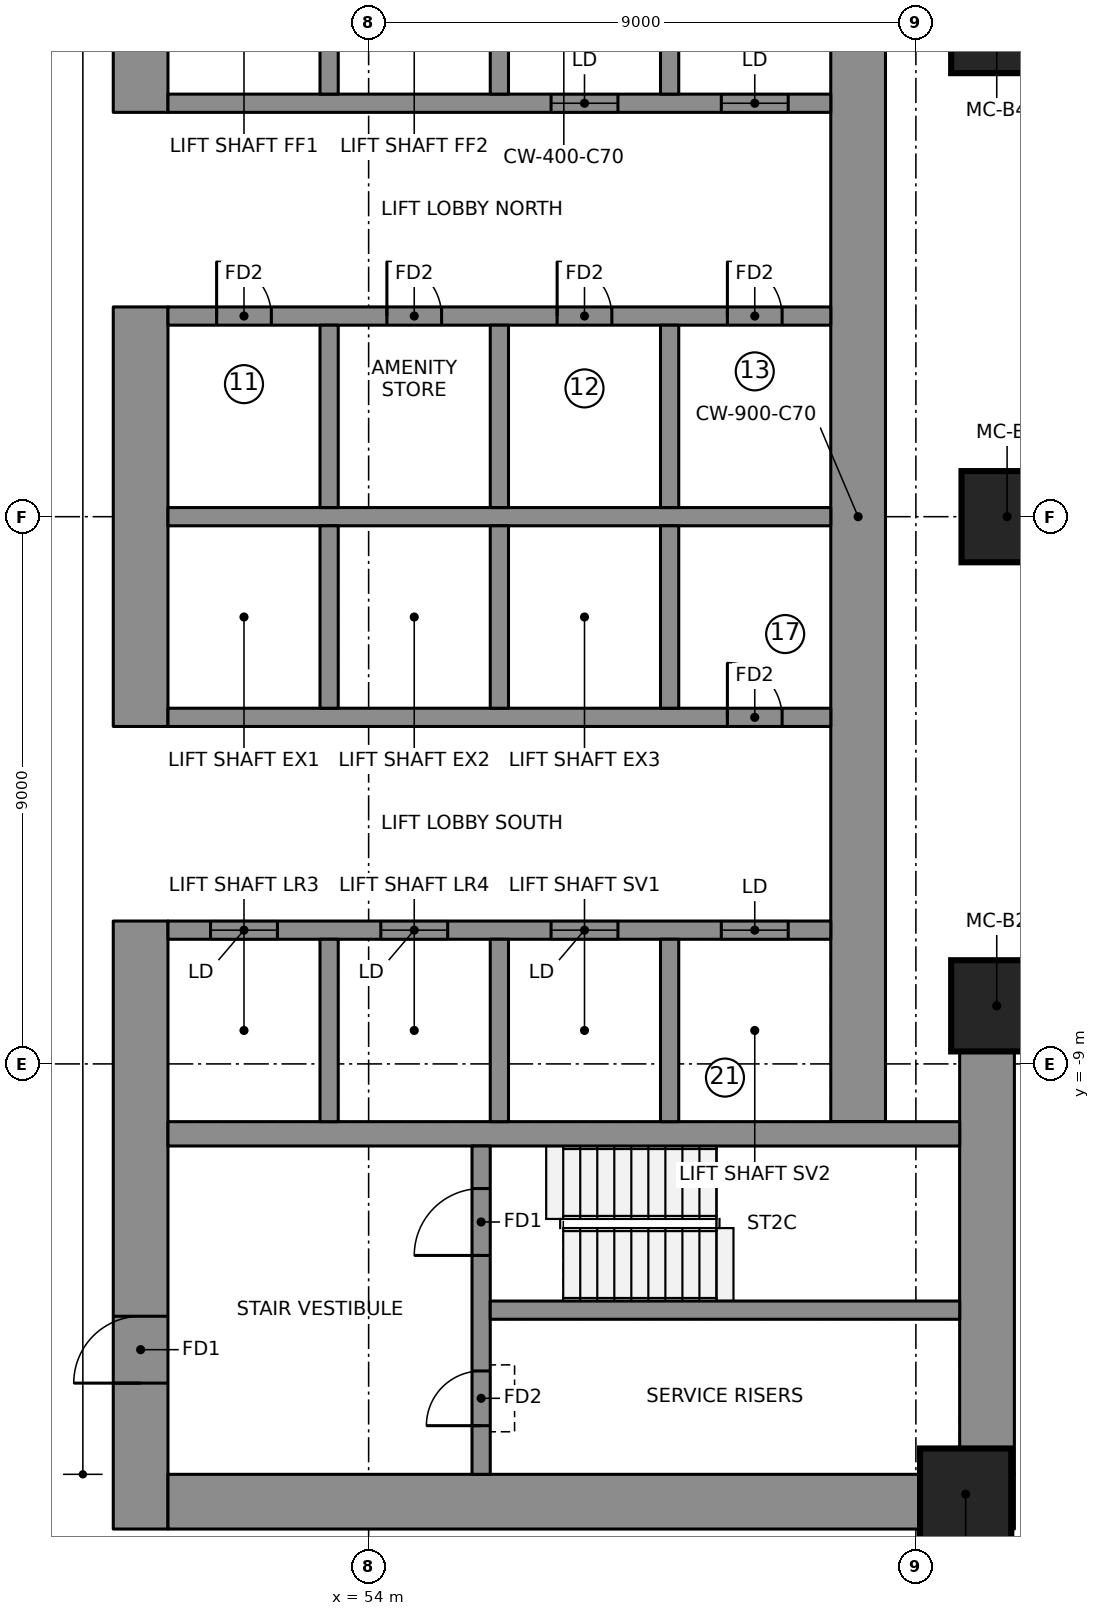
"""IFC4 building model, lengths in metres.
Left out: names, types, materials, properties, quantities, classifications, styles, units other than length and angle.
Written with IfcOpenShell. Run it as: python <this file> out.ifc"""

import sys

from ifc_helpers import new_model, si_unit, direction, frame, frame_2d, origin, origin_2d, place, context, subcontext, project, spatial, rectangle, extrude, element, fill, save


model = new_model("IFC4")
c1 = context("Model", 3, precision=1e-05, world=origin(), true_north=direction((0.0, 1.0)))
c2 = subcontext(c1, "Body", "Model", "MODEL_VIEW")
j1 = project(units=[si_unit("LENGTHUNIT", "METRE"), si_unit("PLANEANGLEUNIT", "RADIAN")], contexts=[c1])
p1 = place(None, origin())
s1 = spatial("IfcSite", under=j1, at=p1, CompositionType="ELEMENT")
p2 = place(p1, origin())
s2 = spatial("IfcBuilding", under=s1, at=p2, CompositionType="ELEMENT")
p3 = place(p2, frame((0.0, 0.0, 151.5)))
s3 = spatial("IfcBuildingStorey", under=s2, at=p3, CompositionType="ELEMENT", Elevation=151.5)
p4 = place(p3, frame((50.25, 6.65, 0.0), z_axis=(0.0, 0.0, 1.0), x_axis=(0.0, 1.0, 0.0)))
e1 = element("IfcWall", 1, at=p4, inside=s3, PredefinedType="SHEAR", context=c2, shape_type="SweptSolid", body=[
    extrude(rectangle(XDim=10.0, YDim=0.9, at=frame_2d((5.0, 0.0))), origin(), (0.0, 0.0, 1.0), 3.55),
])
p5 = place(p4, frame((6.5, 0.0, 0.0)))
e2 = element("IfcOpeningElement", 2, at=p5, cuts=e1, PredefinedType="OPENING", context=c2, shape_type="SweptSolid", body=[
    extrude(rectangle(XDim=1.1, YDim=2.1, at=frame_2d((0.55, 1.05))), frame((0.0, 0.46, 0.0), z_axis=(0.0, -1.0, 0.0), x_axis=(1.0, 0.0, 0.0)), (0.0, 0.0, 1.0), 0.92),
])
p6 = place(p3, frame((50.25, -3.45, 0.0), z_axis=(0.0, 0.0, 1.0), x_axis=(0.0, 1.0, 0.0)))
e3 = element("IfcWall", 3, at=p6, inside=s3, PredefinedType="SHEAR", context=c2, shape_type="SweptSolid", body=[
    extrude(rectangle(XDim=6.9, YDim=0.9, at=frame_2d((3.45, 0.0))), origin(), (0.0, 0.0, 1.0), 3.55),
])
p7 = place(p3, frame((50.25, -16.65, 0.0), z_axis=(0.0, 0.0, 1.0), x_axis=(0.0, 1.0, 0.0)))
e4 = element("IfcWall", 4, at=p7, inside=s3, PredefinedType="SHEAR", context=c2, shape_type="SweptSolid", body=[
    extrude(rectangle(XDim=10.0, YDim=0.9, at=frame_2d((5.0, 0.0))), origin(), (0.0, 0.0, 1.0), 3.55),
])
p8 = place(p7, frame((2.4, 0.0, 0.0)))
e5 = element("IfcOpeningElement", 5, at=p8, cuts=e4, PredefinedType="OPENING", context=c2, shape_type="SweptSolid", body=[
    extrude(rectangle(XDim=1.1, YDim=2.1, at=frame_2d((0.55, 1.05))), frame((0.0, 0.46, 0.0), z_axis=(0.0, -1.0, 0.0), x_axis=(1.0, 0.0, 0.0)), (0.0, 0.0, 1.0), 0.92),
])
p9 = place(p3, frame((50.7, -16.2, 0.0), z_axis=(0.0, 0.0, 1.0), x_axis=(1.0, 0.0, 0.0)))
e6 = element("IfcWall", 6, at=p9, inside=s3, PredefinedType="SHEAR", context=c2, shape_type="SweptSolid", body=[
    extrude(rectangle(XDim=13.92, YDim=0.9, at=frame_2d((6.96, 0.0))), origin(), (0.0, 0.0, 1.0), 3.55),
])
p10 = place(p3, frame((64.17, -15.75, 0.0), z_axis=(0.0, 0.0, 1.0), x_axis=(0.0, 1.0, 0.0)))
e7 = element("IfcWall", 7, at=p10, inside=s3, PredefinedType="SHEAR", context=c2, shape_type="SweptSolid", body=[
    extrude(rectangle(XDim=7.005, YDim=0.9, at=frame_2d((3.503, 0.0))), origin(), (0.0, 0.0, 1.0), 3.55),
])
p11 = place(p3, frame((62.05, -9.95, 0.0), z_axis=(0.0, 0.0, 1.0), x_axis=(0.0, 1.0, 0.0)))
e8 = element("IfcWall", 8, at=p11, inside=s3, PredefinedType="SHEAR", context=c2, shape_type="SweptSolid", body=[
    extrude(rectangle(XDim=19.9, YDim=0.9, at=frame_2d((9.95, 0.0))), origin(), (0.0, 0.0, 1.0), 3.55),
])
p12 = place(p3, frame((50.7, -10.15, 0.0), z_axis=(0.0, 0.0, 1.0), x_axis=(1.0, 0.0, 0.0)))
e9 = element("IfcWall", 9, at=p12, inside=s3, PredefinedType="SHEAR", context=c2, shape_type="SweptSolid", body=[
    extrude(rectangle(XDim=13.02, YDim=0.4, at=frame_2d((6.51, 0.0))), origin(), (0.0, 0.0, 1.0), 3.55),
])
p13 = place(p3, frame((50.7, 0.0, 0.0), z_axis=(0.0, 0.0, 1.0), x_axis=(1.0, 0.0, 0.0)))
e10 = element("IfcWall", 10, at=p13, inside=s3, PredefinedType="SHEAR", context=c2, shape_type="SweptSolid", body=[
    extrude(rectangle(XDim=10.9, YDim=0.3, at=frame_2d((5.45, 0.0))), origin(), (0.0, 0.0, 1.0), 3.55),
])
p14 = place(p3, frame((50.7, 3.3, 0.0), z_axis=(0.0, 0.0, 1.0), x_axis=(1.0, 0.0, 0.0)))
e11 = element("IfcWall", 11, at=p14, inside=s3, PredefinedType="SHEAR", context=c2, shape_type="SweptSolid", body=[
    extrude(rectangle(XDim=10.9, YDim=0.3, at=frame_2d((5.45, 0.0))), origin(), (0.0, 0.0, 1.0), 3.55),
])
p15 = place(p14, frame((0.8, 0.0, 0.0)))
e12 = element("IfcOpeningElement", 12, at=p15, cuts=e11, PredefinedType="OPENING", context=c2, shape_type="SweptSolid", body=[
    extrude(rectangle(XDim=0.9, YDim=2.1, at=frame_2d((0.45, 1.05))), frame((0.0, 0.16, 0.0), z_axis=(0.0, -1.0, 0.0), x_axis=(1.0, 0.0, 0.0)), (0.0, 0.0, 1.0), 0.32),
])
p16 = place(p14, frame((3.6, 0.0, 0.0)))
e13 = element("IfcOpeningElement", 13, at=p16, cuts=e11, PredefinedType="OPENING", context=c2, shape_type="SweptSolid", body=[
    extrude(rectangle(XDim=0.9, YDim=2.1, at=frame_2d((0.45, 1.05))), frame((0.0, 0.16, 0.0), z_axis=(0.0, -1.0, 0.0), x_axis=(1.0, 0.0, 0.0)), (0.0, 0.0, 1.0), 0.32),
])
p17 = place(p14, frame((6.4, 0.0, 0.0)))
e14 = element("IfcOpeningElement", 14, at=p17, cuts=e11, PredefinedType="OPENING", context=c2, shape_type="SweptSolid", body=[
    extrude(rectangle(XDim=0.9, YDim=2.1, at=frame_2d((0.45, 1.05))), frame((0.0, 0.16, 0.0), z_axis=(0.0, -1.0, 0.0), x_axis=(1.0, 0.0, 0.0)), (0.0, 0.0, 1.0), 0.32),
])
p18 = place(p14, frame((9.2, 0.0, 0.0)))
e15 = element("IfcOpeningElement", 15, at=p18, cuts=e11, PredefinedType="OPENING", context=c2, shape_type="SweptSolid", body=[
    extrude(rectangle(XDim=0.9, YDim=2.1, at=frame_2d((0.45, 1.05))), frame((0.0, 0.16, 0.0), z_axis=(0.0, -1.0, 0.0), x_axis=(1.0, 0.0, 0.0)), (0.0, 0.0, 1.0), 0.32),
])
p19 = place(p3, frame((50.7, 6.8, 0.0), z_axis=(0.0, 0.0, 1.0), x_axis=(1.0, 0.0, 0.0)))
e16 = element("IfcWall", 16, at=p19, inside=s3, PredefinedType="SHEAR", context=c2, shape_type="SweptSolid", body=[
    extrude(rectangle(XDim=10.9, YDim=0.3, at=frame_2d((5.45, 0.0))), origin(), (0.0, 0.0, 1.0), 3.55),
])
p20 = place(p19, frame((6.3, 0.0, 0.0)))
e17 = element("IfcOpeningElement", 17, at=p20, cuts=e16, PredefinedType="OPENING", context=c2, shape_type="SweptSolid", body=[
    extrude(rectangle(XDim=1.1, YDim=2.1, at=frame_2d((0.55, 1.05))), frame((0.0, 0.16, 0.0), z_axis=(0.0, -1.0, 0.0), x_axis=(1.0, 0.0, 0.0)), (0.0, 0.0, 1.0), 0.32),
])
p21 = place(p19, frame((9.1, 0.0, 0.0)))
e18 = element("IfcOpeningElement", 18, at=p21, cuts=e16, PredefinedType="OPENING", context=c2, shape_type="SweptSolid", body=[
    extrude(rectangle(XDim=1.1, YDim=2.1, at=frame_2d((0.55, 1.05))), frame((0.0, 0.16, 0.0), z_axis=(0.0, -1.0, 0.0), x_axis=(1.0, 0.0, 0.0)), (0.0, 0.0, 1.0), 0.32),
])
for number, where, z_axis, x_axis in (
    (19, (53.35, 0.15, 0.0), (0.0, 0.0, 1.0), (0.0, 1.0, 0.0)),
    (20, (53.35, 6.95, 0.0), (0.0, 0.0, 1.0), (0.0, 1.0, 0.0)),
    (21, (56.15, 0.15, 0.0), (0.0, 0.0, 1.0), (0.0, 1.0, 0.0)),
    (22, (56.15, 6.95, 0.0), (0.0, 0.0, 1.0), (0.0, 1.0, 0.0)),
    (23, (58.95, 0.15, 0.0), (0.0, 0.0, 1.0), (0.0, 1.0, 0.0)),
    (24, (58.95, 6.95, 0.0), (0.0, 0.0, 1.0), (0.0, 1.0, 0.0)),
):
    element("IfcWall", number, at=place(p3, frame(where, z_axis=z_axis, x_axis=x_axis)), inside=s3, PredefinedType="SHEAR", context=c2, shape_type="SweptSolid", body=[
        extrude(rectangle(XDim=3.0, YDim=0.3, at=frame_2d((1.5, 0.0))), origin(), (0.0, 0.0, 1.0), 3.55),
    ])
p22 = place(p3, frame((50.7, -3.3, 0.0), z_axis=(0.0, 0.0, 1.0), x_axis=(1.0, 0.0, 0.0)))
e25 = element("IfcWall", 25, at=p22, inside=s3, PredefinedType="SHEAR", context=c2, shape_type="SweptSolid", body=[
    extrude(rectangle(XDim=10.9, YDim=0.3, at=frame_2d((5.45, 0.0))), origin(), (0.0, 0.0, 1.0), 3.55),
])
p23 = place(p22, frame((9.2, 0.0, 0.0)))
e26 = element("IfcOpeningElement", 26, at=p23, cuts=e25, PredefinedType="OPENING", context=c2, shape_type="SweptSolid", body=[
    extrude(rectangle(XDim=0.9, YDim=2.1, at=frame_2d((0.45, 1.05))), frame((0.0, 0.16, 0.0), z_axis=(0.0, -1.0, 0.0), x_axis=(1.0, 0.0, 0.0)), (0.0, 0.0, 1.0), 0.32),
])
p24 = place(p3, frame((50.7, -6.8, 0.0), z_axis=(0.0, 0.0, 1.0), x_axis=(1.0, 0.0, 0.0)))
e27 = element("IfcWall", 27, at=p24, inside=s3, PredefinedType="SHEAR", context=c2, shape_type="SweptSolid", body=[
    extrude(rectangle(XDim=10.9, YDim=0.3, at=frame_2d((5.45, 0.0))), origin(), (0.0, 0.0, 1.0), 3.55),
])
p25 = place(p24, frame((0.7, 0.0, 0.0)))
e28 = element("IfcOpeningElement", 28, at=p25, cuts=e27, PredefinedType="OPENING", context=c2, shape_type="SweptSolid", body=[
    extrude(rectangle(XDim=1.1, YDim=2.1, at=frame_2d((0.55, 1.05))), frame((0.0, 0.16, 0.0), z_axis=(0.0, -1.0, 0.0), x_axis=(1.0, 0.0, 0.0)), (0.0, 0.0, 1.0), 0.32),
])
p26 = place(p24, frame((3.5, 0.0, 0.0)))
e29 = element("IfcOpeningElement", 29, at=p26, cuts=e27, PredefinedType="OPENING", context=c2, shape_type="SweptSolid", body=[
    extrude(rectangle(XDim=1.1, YDim=2.1, at=frame_2d((0.55, 1.05))), frame((0.0, 0.16, 0.0), z_axis=(0.0, -1.0, 0.0), x_axis=(1.0, 0.0, 0.0)), (0.0, 0.0, 1.0), 0.32),
])
p27 = place(p24, frame((6.3, 0.0, 0.0)))
e30 = element("IfcOpeningElement", 30, at=p27, cuts=e27, PredefinedType="OPENING", context=c2, shape_type="SweptSolid", body=[
    extrude(rectangle(XDim=1.1, YDim=2.1, at=frame_2d((0.55, 1.05))), frame((0.0, 0.16, 0.0), z_axis=(0.0, -1.0, 0.0), x_axis=(1.0, 0.0, 0.0)), (0.0, 0.0, 1.0), 0.32),
])
p28 = place(p24, frame((9.1, 0.0, 0.0)))
e31 = element("IfcOpeningElement", 31, at=p28, cuts=e27, PredefinedType="OPENING", context=c2, shape_type="SweptSolid", body=[
    extrude(rectangle(XDim=1.1, YDim=2.1, at=frame_2d((0.55, 1.05))), frame((0.0, 0.16, 0.0), z_axis=(0.0, -1.0, 0.0), x_axis=(1.0, 0.0, 0.0)), (0.0, 0.0, 1.0), 0.32),
])
for number, where, z_axis, x_axis in (
    (32, (53.35, -3.15, 0.0), (0.0, 0.0, 1.0), (0.0, 1.0, 0.0)),
    (33, (53.35, -9.95, 0.0), (0.0, 0.0, 1.0), (0.0, 1.0, 0.0)),
    (34, (56.15, -3.15, 0.0), (0.0, 0.0, 1.0), (0.0, 1.0, 0.0)),
    (35, (56.15, -9.95, 0.0), (0.0, 0.0, 1.0), (0.0, 1.0, 0.0)),
    (36, (58.95, -3.15, 0.0), (0.0, 0.0, 1.0), (0.0, 1.0, 0.0)),
    (37, (58.95, -9.95, 0.0), (0.0, 0.0, 1.0), (0.0, 1.0, 0.0)),
):
    element("IfcWall", number, at=place(p3, frame(where, z_axis=z_axis, x_axis=x_axis)), inside=s3, PredefinedType="SHEAR", context=c2, shape_type="SweptSolid", body=[
        extrude(rectangle(XDim=3.0, YDim=0.3, at=frame_2d((1.5, 0.0))), origin(), (0.0, 0.0, 1.0), 3.55),
    ])
p29 = place(p3, frame((55.85, -15.75, 0.0), z_axis=(0.0, 0.0, 1.0), x_axis=(0.0, 1.0, 0.0)))
e38 = element("IfcWall", 38, at=p29, inside=s3, PredefinedType="SHEAR", context=c2, shape_type="SweptSolid", body=[
    extrude(rectangle(XDim=5.4, YDim=0.3, at=frame_2d((2.7, 0.0))), origin(), (0.0, 0.0, 1.0), 3.55),
])
p30 = place(p29, frame((3.6, 0.0, 0.0)))
e39 = element("IfcOpeningElement", 39, at=p30, cuts=e38, PredefinedType="OPENING", context=c2, shape_type="SweptSolid", body=[
    extrude(rectangle(XDim=1.1, YDim=2.1, at=frame_2d((0.55, 1.05))), frame((0.0, 0.16, 0.0), z_axis=(0.0, -1.0, 0.0), x_axis=(1.0, 0.0, 0.0)), (0.0, 0.0, 1.0), 0.32),
])
p31 = place(p29, frame((0.8, 0.0, 0.0)))
e40 = element("IfcOpeningElement", 40, at=p31, cuts=e38, PredefinedType="OPENING", context=c2, shape_type="SweptSolid", body=[
    extrude(rectangle(XDim=0.9, YDim=2.1, at=frame_2d((0.45, 1.05))), frame((0.0, 0.16, 0.0), z_axis=(0.0, -1.0, 0.0), x_axis=(1.0, 0.0, 0.0)), (0.0, 0.0, 1.0), 0.32),
])
p32 = place(p3, frame((56.0, -13.05, 0.0), z_axis=(0.0, 0.0, 1.0), x_axis=(1.0, 0.0, 0.0)))
e41 = element("IfcWall", 41, at=p32, inside=s3, PredefinedType="SHEAR", context=c2, shape_type="SweptSolid", body=[
    extrude(rectangle(XDim=7.72, YDim=0.3, at=frame_2d((3.86, 0.0))), origin(), (0.0, 0.0, 1.0), 3.55),
])
for number, where, z_axis, x_axis in (
    (42, (63.819, -16.075, 0.0), (0.0, 0.0, 1.0), (1.0, 0.0, 0.0)),
    (43, (64.33, -8.045, 0.0), (0.0, 0.0, 1.0), (1.0, 0.0, 0.0)),
    (44, (64.5, 0.0, 0.0), (0.0, 0.0, 1.0), (1.0, 0.0, 0.0)),
    (45, (64.33, 8.045, 0.0), (0.0, 0.0, 1.0), (1.0, 0.0, 0.0)),
):
    element("IfcColumn", number, at=place(p3, frame(where, z_axis=z_axis, x_axis=x_axis)), inside=s3, PredefinedType="COLUMN", context=c2, shape_type="SweptSolid", body=[
        extrude(rectangle(XDim=1.5, YDim=1.5, at=origin_2d()), origin(), (0.0, 0.0, 1.0), 3.55),
    ])
p33 = place(p20, origin())
e46 = element("IfcDoor", 46, at=p33, inside=s3, OperationType="DOUBLE_DOOR_SLIDING", PredefinedType="DOOR", context=c2, shape_type="SweptSolid", body=[
    extrude(rectangle(XDim=1.1, YDim=2.1, at=frame_2d((0.55, 1.05))), frame((0.0, 0.025, 0.0), z_axis=(0.0, -1.0, 0.0), x_axis=(1.0, 0.0, 0.0)), (0.0, 0.0, 1.0), 0.05),
])
fill(e17, e46)
p34 = place(p21, origin())
e47 = element("IfcDoor", 47, at=p34, inside=s3, OperationType="DOUBLE_DOOR_SLIDING", PredefinedType="DOOR", context=c2, shape_type="SweptSolid", body=[
    extrude(rectangle(XDim=1.1, YDim=2.1, at=frame_2d((0.55, 1.05))), frame((0.0, 0.025, 0.0), z_axis=(0.0, -1.0, 0.0), x_axis=(1.0, 0.0, 0.0)), (0.0, 0.0, 1.0), 0.05),
])
fill(e18, e47)
p35 = place(p25, origin())
e48 = element("IfcDoor", 48, at=p35, inside=s3, OperationType="DOUBLE_DOOR_SLIDING", PredefinedType="DOOR", context=c2, shape_type="SweptSolid", body=[
    extrude(rectangle(XDim=1.1, YDim=2.1, at=frame_2d((0.55, 1.05))), frame((0.0, 0.025, 0.0), z_axis=(0.0, -1.0, 0.0), x_axis=(1.0, 0.0, 0.0)), (0.0, 0.0, 1.0), 0.05),
])
fill(e28, e48)
p36 = place(p26, origin())
e49 = element("IfcDoor", 49, at=p36, inside=s3, OperationType="DOUBLE_DOOR_SLIDING", PredefinedType="DOOR", context=c2, shape_type="SweptSolid", body=[
    extrude(rectangle(XDim=1.1, YDim=2.1, at=frame_2d((0.55, 1.05))), frame((0.0, 0.025, 0.0), z_axis=(0.0, -1.0, 0.0), x_axis=(1.0, 0.0, 0.0)), (0.0, 0.0, 1.0), 0.05),
])
fill(e29, e49)
p37 = place(p27, origin())
e50 = element("IfcDoor", 50, at=p37, inside=s3, OperationType="DOUBLE_DOOR_SLIDING", PredefinedType="DOOR", context=c2, shape_type="SweptSolid", body=[
    extrude(rectangle(XDim=1.1, YDim=2.1, at=frame_2d((0.55, 1.05))), frame((0.0, 0.025, 0.0), z_axis=(0.0, -1.0, 0.0), x_axis=(1.0, 0.0, 0.0)), (0.0, 0.0, 1.0), 0.05),
])
fill(e30, e50)
p38 = place(p28, origin())
e51 = element("IfcDoor", 51, at=p38, inside=s3, OperationType="DOUBLE_DOOR_SLIDING", PredefinedType="DOOR", context=c2, shape_type="SweptSolid", body=[
    extrude(rectangle(XDim=1.1, YDim=2.1, at=frame_2d((0.55, 1.05))), frame((0.0, 0.025, 0.0), z_axis=(0.0, -1.0, 0.0), x_axis=(1.0, 0.0, 0.0)), (0.0, 0.0, 1.0), 0.05),
])
fill(e31, e51)
p39 = place(p30, origin())
e52 = element("IfcDoor", 52, at=p39, inside=s3, OperationType="SINGLE_SWING_RIGHT", PredefinedType="DOOR", context=c2, shape_type="SweptSolid", body=[
    extrude(rectangle(XDim=1.1, YDim=2.1, at=frame_2d((0.55, 1.05))), frame((0.0, 0.025, 0.0), z_axis=(0.0, -1.0, 0.0), x_axis=(1.0, 0.0, 0.0)), (0.0, 0.0, 1.0), 0.05),
])
fill(e39, e52)
p40 = place(p8, origin())
e53 = element("IfcDoor", 53, at=p40, inside=s3, OperationType="SINGLE_SWING_RIGHT", PredefinedType="DOOR", context=c2, shape_type="SweptSolid", body=[
    extrude(rectangle(XDim=1.1, YDim=2.1, at=frame_2d((0.55, 1.05))), frame((0.0, 0.025, 0.0), z_axis=(0.0, -1.0, 0.0), x_axis=(1.0, 0.0, 0.0)), (0.0, 0.0, 1.0), 0.05),
])
fill(e5, e53)
p41 = place(p31, origin())
e54 = element("IfcDoor", 54, at=p41, inside=s3, OperationType="SINGLE_SWING_LEFT", PredefinedType="DOOR", context=c2, shape_type="SweptSolid", body=[
    extrude(rectangle(XDim=0.9, YDim=2.1, at=frame_2d((0.45, 1.05))), frame((0.0, 0.025, 0.0), z_axis=(0.0, -1.0, 0.0), x_axis=(1.0, 0.0, 0.0)), (0.0, 0.0, 1.0), 0.05),
])
fill(e40, e54)
p42 = place(p15, origin())
e55 = element("IfcDoor", 55, at=p42, inside=s3, OperationType="SINGLE_SWING_LEFT", PredefinedType="DOOR", context=c2, shape_type="SweptSolid", body=[
    extrude(rectangle(XDim=0.9, YDim=2.1, at=frame_2d((0.45, 1.05))), frame((0.0, 0.025, 0.0), z_axis=(0.0, -1.0, 0.0), x_axis=(1.0, 0.0, 0.0)), (0.0, 0.0, 1.0), 0.05),
])
fill(e12, e55)
p43 = place(p16, origin())
e56 = element("IfcDoor", 56, at=p43, inside=s3, OperationType="SINGLE_SWING_LEFT", PredefinedType="DOOR", context=c2, shape_type="SweptSolid", body=[
    extrude(rectangle(XDim=0.9, YDim=2.1, at=frame_2d((0.45, 1.05))), frame((0.0, 0.025, 0.0), z_axis=(0.0, -1.0, 0.0), x_axis=(1.0, 0.0, 0.0)), (0.0, 0.0, 1.0), 0.05),
])
fill(e13, e56)
p44 = place(p17, origin())
e57 = element("IfcDoor", 57, at=p44, inside=s3, OperationType="SINGLE_SWING_LEFT", PredefinedType="DOOR", context=c2, shape_type="SweptSolid", body=[
    extrude(rectangle(XDim=0.9, YDim=2.1, at=frame_2d((0.45, 1.05))), frame((0.0, 0.025, 0.0), z_axis=(0.0, -1.0, 0.0), x_axis=(1.0, 0.0, 0.0)), (0.0, 0.0, 1.0), 0.05),
])
fill(e14, e57)
p45 = place(p18, origin())
e58 = element("IfcDoor", 58, at=p45, inside=s3, OperationType="SINGLE_SWING_LEFT", PredefinedType="DOOR", context=c2, shape_type="SweptSolid", body=[
    extrude(rectangle(XDim=0.9, YDim=2.1, at=frame_2d((0.45, 1.05))), frame((0.0, 0.025, 0.0), z_axis=(0.0, -1.0, 0.0), x_axis=(1.0, 0.0, 0.0)), (0.0, 0.0, 1.0), 0.05),
])
fill(e15, e58)
p46 = place(p23, origin())
e59 = element("IfcDoor", 59, at=p46, inside=s3, OperationType="SINGLE_SWING_LEFT", PredefinedType="DOOR", context=c2, shape_type="SweptSolid", body=[
    extrude(rectangle(XDim=0.9, YDim=2.1, at=frame_2d((0.45, 1.05))), frame((0.0, 0.025, 0.0), z_axis=(0.0, -1.0, 0.0), x_axis=(1.0, 0.0, 0.0)), (0.0, 0.0, 1.0), 0.05),
])
fill(e26, e59)
save(model, sys.argv[1])
